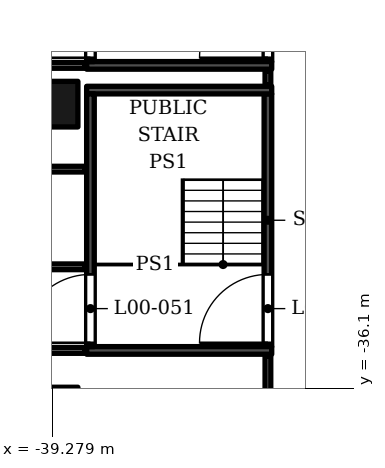
"""IFC4 building model, lengths in metres.
Left out: names, types, materials, properties, quantities, classifications, styles, units other than length and angle.
Written with IfcOpenShell. Run it as: python <this file> out.ifc"""

import sys

from ifc_helpers import new_model, si_unit, direction, frame, frame_2d, origin, origin_2d, place, context, subcontext, project, spatial, rectangle, extrude, element, fill, save


model = new_model("IFC4")
c1 = context("Model", 3, precision=1e-05, world=origin(), true_north=direction((0.0, 1.0)))
c2 = subcontext(c1, "Body", "Model", "MODEL_VIEW")
j1 = project(units=[si_unit("LENGTHUNIT", "METRE"), si_unit("PLANEANGLEUNIT", "RADIAN")], contexts=[c1])
p1 = place(None, origin())
s1 = spatial("IfcSite", under=j1, at=p1, CompositionType="ELEMENT")
p2 = place(p1, origin())
s2 = spatial("IfcBuilding", under=s1, at=p2, CompositionType="ELEMENT")
p3 = place(p2, origin())
s3 = spatial("IfcBuildingStorey", under=s2, at=p3, CompositionType="ELEMENT", Elevation=0.0)
for number, where, z_axis, x_axis in (
    (1, (-39.2, -36.669, 0.0), (0.0, 0.0, 1.0), (1.0, 0.0, 0.0)),
    (2, (-39.2, -28.62, 0.0), (0.0, 0.0, 1.0), (1.0, 0.0, 0.0)),
):
    element("IfcColumn", number, at=place(p3, frame(where, z_axis=z_axis, x_axis=x_axis)), inside=s3, PredefinedType="COLUMN", context=c2, shape_type="SweptSolid", body=[
        extrude(rectangle(XDim=1.2, YDim=1.2, at=origin_2d()), origin(), (0.0, 0.0, 1.0), 9.0),
    ])
for number, where, z_axis, x_axis in (
    (3, (-38.37, -35.1, 0.0), (0.0, 0.0, 1.0), (1.0, 0.0, 0.0)),
    (4, (-38.37, -28.25, 0.0), (0.0, 0.0, 1.0), (1.0, 0.0, 0.0)),
):
    element("IfcWall", number, at=place(p3, frame(where, z_axis=z_axis, x_axis=x_axis)), inside=s3, PredefinedType="SOLIDWALL", context=c2, shape_type="SweptSolid", body=[
        extrude(rectangle(XDim=4.87, YDim=0.2, at=frame_2d((2.435, 0.0))), origin(), (0.0, 0.0, 1.0), 8.5),
    ])
p4 = place(p3, frame((-38.27, -35.0, 0.0), z_axis=(0.0, 0.0, 1.0), x_axis=(0.0, 1.0, 0.0)))
e5 = element("IfcWall", 5, at=p4, inside=s3, PredefinedType="SOLIDWALL", context=c2, shape_type="SweptSolid", body=[
    extrude(rectangle(XDim=6.65, YDim=0.2, at=frame_2d((3.325, 0.0))), origin(), (0.0, 0.0, 1.0), 8.5),
])
p5 = place(p4, frame((0.1, 0.0, 0.0)))
e6 = element("IfcOpeningElement", 6, at=p5, cuts=e5, PredefinedType="OPENING", context=c2, shape_type="SweptSolid", body=[
    extrude(rectangle(XDim=1.8, YDim=2.4, at=frame_2d((0.9, 1.2))), frame((0.0, 0.11, 0.0), z_axis=(0.0, -1.0, 0.0), x_axis=(1.0, 0.0, 0.0)), (0.0, 0.0, 1.0), 0.22),
])
p6 = place(p3, frame((-33.6, -35.0, 0.0), z_axis=(0.0, 0.0, 1.0), x_axis=(0.0, 1.0, 0.0)))
e7 = element("IfcWall", 7, at=p6, inside=s3, PredefinedType="SOLIDWALL", context=c2, shape_type="SweptSolid", body=[
    extrude(rectangle(XDim=6.65, YDim=0.2, at=frame_2d((3.325, 0.0))), origin(), (0.0, 0.0, 1.0), 8.5),
])
p7 = place(p6, frame((0.1, 0.0, 0.0)))
e8 = element("IfcOpeningElement", 8, at=p7, cuts=e7, PredefinedType="OPENING", context=c2, shape_type="SweptSolid", body=[
    extrude(rectangle(XDim=1.8, YDim=2.4, at=frame_2d((0.9, 1.2))), frame((0.0, 0.11, 0.0), z_axis=(0.0, -1.0, 0.0), x_axis=(1.0, 0.0, 0.0)), (0.0, 0.0, 1.0), 0.22),
])
p8 = place(p3, frame((-38.37, -27.6, 0.0), z_axis=(0.0, 0.0, 1.0), x_axis=(1.0, 0.0, 0.0)))
e9 = element("IfcWall", 9, at=p8, inside=s3, PredefinedType="SOLIDWALL", context=c2, shape_type="SweptSolid", body=[
    extrude(rectangle(XDim=4.87, YDim=0.2, at=frame_2d((2.435, 0.0))), origin(), (0.0, 0.0, 1.0), 8.5),
])
p9 = place(p3, frame((-38.27, -27.5, 0.0), z_axis=(0.0, 0.0, 1.0), x_axis=(0.0, 1.0, 0.0)))
e10 = element("IfcWall", 10, at=p9, inside=s3, PredefinedType="SOLIDWALL", context=c2, shape_type="SweptSolid", body=[
    extrude(rectangle(XDim=6.65, YDim=0.2, at=frame_2d((3.325, 0.0))), origin(), (0.0, 0.0, 1.0), 8.5),
])
p10 = place(p9, frame((0.1, 0.0, 0.0)))
e11 = element("IfcOpeningElement", 11, at=p10, cuts=e10, PredefinedType="OPENING", context=c2, shape_type="SweptSolid", body=[
    extrude(rectangle(XDim=1.8, YDim=2.4, at=frame_2d((0.9, 1.2))), frame((0.0, 0.11, 0.0), z_axis=(0.0, -1.0, 0.0), x_axis=(1.0, 0.0, 0.0)), (0.0, 0.0, 1.0), 0.22),
])
p11 = place(p3, frame((-33.6, -27.5, 0.0), z_axis=(0.0, 0.0, 1.0), x_axis=(0.0, 1.0, 0.0)))
e12 = element("IfcWall", 12, at=p11, inside=s3, PredefinedType="SOLIDWALL", context=c2, shape_type="SweptSolid", body=[
    extrude(rectangle(XDim=6.65, YDim=0.2, at=frame_2d((3.325, 0.0))), origin(), (0.0, 0.0, 1.0), 8.5),
])
p12 = place(p11, frame((0.1, 0.0, 0.0)))
e13 = element("IfcOpeningElement", 13, at=p12, cuts=e12, PredefinedType="OPENING", context=c2, shape_type="SweptSolid", body=[
    extrude(rectangle(XDim=1.8, YDim=2.4, at=frame_2d((0.9, 1.2))), frame((0.0, 0.11, 0.0), z_axis=(0.0, -1.0, 0.0), x_axis=(1.0, 0.0, 0.0)), (0.0, 0.0, 1.0), 0.22),
])
p13 = place(p3, frame((-33.6, -44.6, 0.0), z_axis=(0.0, 0.0, 1.0), x_axis=(0.0, 1.0, 0.0)))
e14 = element("IfcWall", 14, at=p13, inside=s3, PredefinedType="PARTITIONING", context=c2, shape_type="SweptSolid", body=[
    extrude(rectangle(XDim=9.36, YDim=0.15, at=frame_2d((4.68, 0.0))), origin(), (0.0, 0.0, 1.0), 7.3),
])
p14 = place(p13, frame((6.7, 0.0, 0.0)))
e15 = element("IfcOpeningElement", 15, at=p14, cuts=e14, PredefinedType="OPENING", context=c2, shape_type="SweptSolid", body=[
    extrude(rectangle(XDim=1.2, YDim=2.1, at=frame_2d((0.6, 1.05))), frame((0.0, 0.085, 0.0), z_axis=(0.0, -1.0, 0.0), x_axis=(1.0, 0.0, 0.0)), (0.0, 0.0, 1.0), 0.17),
])
p15 = place(p3, frame((-49.72, -35.101, 0.0), z_axis=(0.0, 0.0, 1.0), x_axis=(1.0, 0.0, 0.0)))
e16 = element("IfcWall", 16, at=p15, inside=s3, PredefinedType="PARTITIONING", context=c2, shape_type="SweptSolid", body=[
    extrude(rectangle(XDim=11.31, YDim=0.151, at=frame_2d((5.655, 0.0))), origin(), (0.0, 0.0, 1.0), 7.6),
])
p16 = place(p15, frame((5.155, 0.0, 0.0)))
e17 = element("IfcOpeningElement", 17, at=p16, cuts=e16, PredefinedType="OPENING", context=c2, shape_type="SweptSolid", body=[
    extrude(rectangle(XDim=1.2, YDim=2.1, at=frame_2d((0.6, 1.05))), frame((0.0, 0.085, 0.0), z_axis=(0.0, -1.0, 0.0), x_axis=(1.0, 0.0, 0.0)), (0.0, 0.0, 1.0), 0.171),
])
p17 = place(p3, frame((-49.72, -32.9, 0.0), z_axis=(0.0, 0.0, 1.0), x_axis=(1.0, 0.0, 0.0)))
e18 = element("IfcWall", 18, at=p17, inside=s3, PredefinedType="PARTITIONING", context=c2, shape_type="SweptSolid", body=[
    extrude(rectangle(XDim=11.31, YDim=0.15, at=frame_2d((5.655, 0.0))), origin(), (0.0, 0.0, 1.0), 7.6),
])
p18 = place(p3, frame((-40.6, -30.33, 0.0), z_axis=(0.0, 0.0, 1.0), x_axis=(1.0, 0.0, 0.0)))
e19 = element("IfcWall", 19, at=p18, inside=s3, PredefinedType="PARTITIONING", context=c2, shape_type="SweptSolid", body=[
    extrude(rectangle(XDim=2.19, YDim=0.15, at=frame_2d((1.095, 0.0))), origin(), (0.0, 0.0, 1.0), 8.5),
])
p19 = place(p3, frame((-33.6, -28.11, 0.0), z_axis=(0.0, 0.0, 1.0), x_axis=(0.0, 1.0, 0.0)))
e20 = element("IfcWall", 20, at=p19, inside=s3, PredefinedType="PARTITIONING", context=c2, shape_type="SweptSolid", body=[
    extrude(rectangle(XDim=0.37, YDim=0.15, at=frame_2d((0.185, 0.0))), origin(), (0.0, 0.0, 1.0), 8.5),
])
p20 = place(p3, frame((-49.72, -27.601, 0.0), z_axis=(0.0, 0.0, 1.0), x_axis=(1.0, 0.0, 0.0)))
e21 = element("IfcWall", 21, at=p20, inside=s3, PredefinedType="PARTITIONING", context=c2, shape_type="SweptSolid", body=[
    extrude(rectangle(XDim=11.31, YDim=0.151, at=frame_2d((5.655, 0.0))), origin(), (0.0, 0.0, 1.0), 7.6),
])
p21 = place(p20, frame((5.155, 0.0, 0.0)))
e22 = element("IfcOpeningElement", 22, at=p21, cuts=e21, PredefinedType="OPENING", context=c2, shape_type="SweptSolid", body=[
    extrude(rectangle(XDim=1.2, YDim=2.1, at=frame_2d((0.6, 1.05))), frame((0.0, 0.085, 0.0), z_axis=(0.0, -1.0, 0.0), x_axis=(1.0, 0.0, 0.0)), (0.0, 0.0, 1.0), 0.171),
])
p22 = place(p7, origin())
e23 = element("IfcDoor", 23, at=p22, inside=s3, OperationType="DOUBLE_DOOR_SINGLE_SWING", PredefinedType="DOOR", context=c2, shape_type="SweptSolid", body=[
    extrude(rectangle(XDim=1.8, YDim=2.4, at=frame_2d((0.9, 1.2))), frame((0.0, 0.025, 0.0), z_axis=(0.0, -1.0, 0.0), x_axis=(1.0, 0.0, 0.0)), (0.0, 0.0, 1.0), 0.05),
])
fill(e8, e23)
p23 = place(p5, origin())
e24 = element("IfcDoor", 24, at=p23, inside=s3, OperationType="DOUBLE_DOOR_SINGLE_SWING", PredefinedType="DOOR", context=c2, shape_type="SweptSolid", body=[
    extrude(rectangle(XDim=1.8, YDim=2.4, at=frame_2d((0.9, 1.2))), frame((0.0, 0.025, 0.0), z_axis=(0.0, -1.0, 0.0), x_axis=(1.0, 0.0, 0.0)), (0.0, 0.0, 1.0), 0.05),
])
fill(e6, e24)
p24 = place(p12, origin())
e25 = element("IfcDoor", 25, at=p24, inside=s3, OperationType="DOUBLE_DOOR_SINGLE_SWING", PredefinedType="DOOR", context=c2, shape_type="SweptSolid", body=[
    extrude(rectangle(XDim=1.8, YDim=2.4, at=frame_2d((0.9, 1.2))), frame((0.0, 0.025, 0.0), z_axis=(0.0, -1.0, 0.0), x_axis=(1.0, 0.0, 0.0)), (0.0, 0.0, 1.0), 0.05),
])
fill(e13, e25)
p25 = place(p10, origin())
e26 = element("IfcDoor", 26, at=p25, inside=s3, OperationType="DOUBLE_DOOR_SINGLE_SWING", PredefinedType="DOOR", context=c2, shape_type="SweptSolid", body=[
    extrude(rectangle(XDim=1.8, YDim=2.4, at=frame_2d((0.9, 1.2))), frame((0.0, 0.025, 0.0), z_axis=(0.0, -1.0, 0.0), x_axis=(1.0, 0.0, 0.0)), (0.0, 0.0, 1.0), 0.05),
])
fill(e11, e26)
save(model, sys.argv[1])
